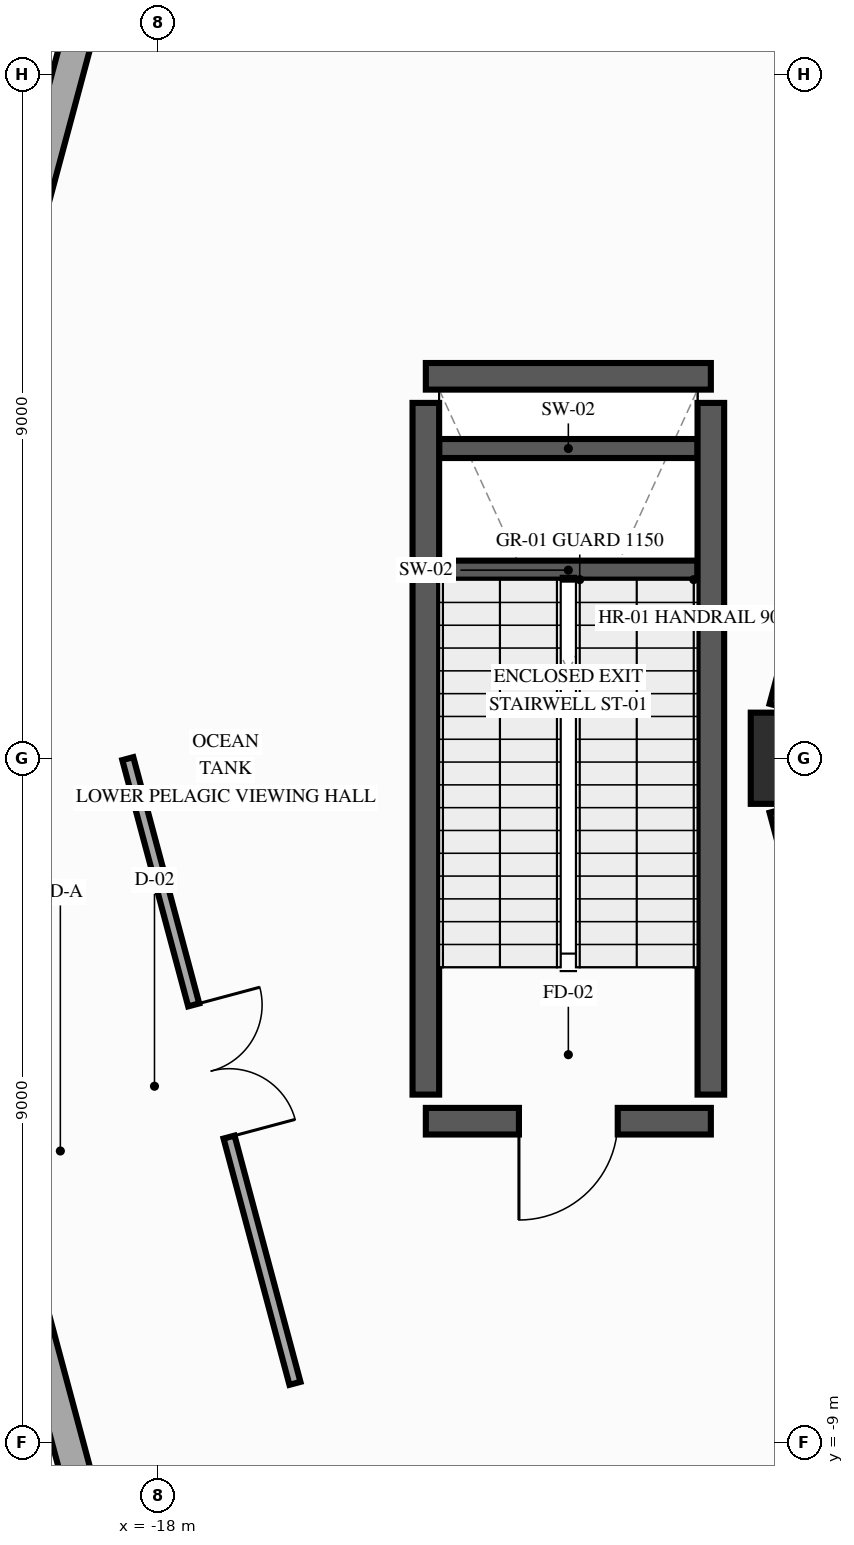
"""IFC4 building model, lengths in metres.
Left out: names, types, materials, properties, quantities, classifications, styles, units other than length and angle.
Written with IfcOpenShell. Run it as: python <this file> out.ifc"""

import sys

from ifc_helpers import new_model, si_unit, direction, frame, frame_2d, origin, origin_2d, place, context, subcontext, project, spatial, rectangle, extrude, element, fill, save


model = new_model("IFC4")
c1 = context("Model", 3, precision=1e-05, world=origin(), true_north=direction((0.0, 1.0)))
c2 = subcontext(c1, "Body", "Model", "MODEL_VIEW")
j1 = project(units=[si_unit("LENGTHUNIT", "METRE"), si_unit("PLANEANGLEUNIT", "RADIAN")], contexts=[c1])
p1 = place(None, origin())
s1 = spatial("IfcSite", under=j1, at=p1, CompositionType="ELEMENT")
p2 = place(p1, origin())
s2 = spatial("IfcBuilding", under=s1, at=p2, CompositionType="ELEMENT")
p3 = place(p2, origin())
s3 = spatial("IfcBuildingStorey", under=s2, at=p3, CompositionType="ELEMENT", Elevation=0.0)
p4 = place(p3, frame((-9.6, 0.0, 0.0), z_axis=(0.0, 0.0, 1.0), x_axis=(-1.0, 0.0, 0.0)))
e1 = element("IfcColumn", 1, at=p4, inside=s3, PredefinedType="COLUMN", context=c2, shape_type="SweptSolid", body=[
    extrude(rectangle(XDim=1.2, YDim=1.2, at=origin_2d()), origin(), (0.0, 0.0, 1.0), 5.4),
])
for number, where, z_axis, x_axis in (
    (2, (-8.469, 4.22, 0.0), (0.0, 0.0, 1.0), (-0.259, -0.966, 0.0)),
    (3, (-9.445, -0.58, 0.0), (0.0, 0.0, 1.0), (0.259, -0.966, 0.0)),
):
    element("IfcWall", number, at=place(p3, frame(where, z_axis=z_axis, x_axis=x_axis)), inside=s3, PredefinedType="SHEAR", context=c2, shape_type="SweptSolid", body=[
        extrude(rectangle(XDim=3.769, YDim=1.05, at=frame_2d((1.884, 0.0))), origin(), (0.0, 0.0, 1.0), 5.12),
    ])
p5 = place(p3, frame((-21.42, 0.671, 0.0), z_axis=(0.0, 0.0, 1.0), x_axis=(0.258787599316, 0.965934251614, 0.0)))
e4 = element("IfcWall", 4, at=p5, inside=s3, PredefinedType="SOLIDWALL", context=c2, shape_type="SweptSolid", body=[
    extrude(rectangle(XDim=9.792, YDim=0.4, at=frame_2d((4.896, 0.0))), origin(), (0.0, 0.0, 1.0), 4.255),
])
p6 = place(p5, frame((4.371, 0.0, 0.9)))
e5 = element("IfcOpeningElement", 5, at=p6, cuts=e4, PredefinedType="OPENING", context=c2, shape_type="SweptSolid", body=[
    extrude(rectangle(XDim=1.05, YDim=2.0, at=frame_2d((0.525, 1.0))), frame((0.0, 0.21, 0.0), z_axis=(0.0, -1.0, 0.0), x_axis=(1.0, 0.0, 0.0)), (0.0, 0.0, 1.0), 0.42),
])
p7 = place(p3, frame((-18.886, -10.129, 0.0), z_axis=(0.0, 0.0, 1.0), x_axis=(-0.258787599316, 0.965934251614, 0.0)))
e6 = element("IfcWall", 6, at=p7, inside=s3, PredefinedType="SOLIDWALL", context=c2, shape_type="SweptSolid", body=[
    extrude(rectangle(XDim=9.792, YDim=0.4, at=frame_2d((4.896, 0.0))), origin(), (0.0, 0.0, 1.0), 4.255),
])
p8 = place(p7, frame((3.296, 0.0, 0.0)))
e7 = element("IfcOpeningElement", 7, at=p8, cuts=e6, PredefinedType="OPENING", context=c2, shape_type="SweptSolid", body=[
    extrude(rectangle(XDim=3.2, YDim=3.0, at=frame_2d((1.6, 1.5))), frame((0.0, 0.21, 0.0), z_axis=(0.0, -1.0, 0.0), x_axis=(1.0, 0.0, 0.0)), (0.0, 0.0, 1.0), 0.42),
])
for number, where, z_axis, x_axis in (
    (8, (-14.3, 2.475, 0.0), (0.0, 0.0, 1.0), (1.0, 0.0, 0.0)),
    (9, (-14.3, 4.075, 0.0), (0.0, 0.0, 1.0), (1.0, 0.0, 0.0)),
):
    element("IfcWall", number, at=place(p3, frame(where, z_axis=z_axis, x_axis=x_axis)), inside=s3, PredefinedType="SHEAR", context=c2, shape_type="SweptSolid", body=[
        extrude(rectangle(XDim=3.4, YDim=0.25, at=frame_2d((1.7, 0.0))), origin(), (0.0, 0.0, 1.0), 2.5),
    ])
p9 = place(p3, frame((-10.725, -4.775, 0.0), z_axis=(0.0, 0.0, 1.0), x_axis=(-1.0, 0.0, 0.0)))
e10 = element("IfcWall", 10, at=p9, inside=s3, PredefinedType="SHEAR", context=c2, shape_type="SweptSolid", body=[
    extrude(rectangle(XDim=3.75, YDim=0.35, at=frame_2d((1.875, 0.0))), origin(), (0.0, 0.0, 1.0), 5.12),
])
p10 = place(p9, frame((1.225, 0.0, 0.0)))
e11 = element("IfcOpeningElement", 11, at=p10, cuts=e10, PredefinedType="OPENING", context=c2, shape_type="SweptSolid", body=[
    extrude(rectangle(XDim=1.3, YDim=2.2, at=frame_2d((0.65, 1.1))), frame((0.0, 0.185, 0.0), z_axis=(0.0, -1.0, 0.0), x_axis=(1.0, 0.0, 0.0)), (0.0, 0.0, 1.0), 0.37),
])
p11 = place(p3, frame((-14.475, 5.025, 0.0), z_axis=(0.0, 0.0, 1.0), x_axis=(1.0, 0.0, 0.0)))
e12 = element("IfcWall", 12, at=p11, inside=s3, PredefinedType="SHEAR", context=c2, shape_type="SweptSolid", body=[
    extrude(rectangle(XDim=3.75, YDim=0.35, at=frame_2d((1.875, 0.0))), origin(), (0.0, 0.0, 1.0), 5.12),
])
for number, where, z_axis, x_axis in (
    (13, (-14.475, -4.425, 0.0), (0.0, 0.0, 1.0), (0.0, 1.0, 0.0)),
    (14, (-10.725, -4.425, 0.0), (0.0, 0.0, 1.0), (0.0, 1.0, 0.0)),
):
    element("IfcWall", number, at=place(p3, frame(where, z_axis=z_axis, x_axis=x_axis)), inside=s3, PredefinedType="SHEAR", context=c2, shape_type="SweptSolid", body=[
        extrude(rectangle(XDim=9.1, YDim=0.35, at=frame_2d((4.55, 0.0))), origin(), (0.0, 0.0, 1.0), 5.12),
    ])
p12 = place(p3, frame((-18.396, -0.005, 0.0), z_axis=(0.0, 0.0, 1.0), x_axis=(0.258450171781, -0.966024590115, 0.0)))
e15 = element("IfcWall", 15, at=p12, inside=s3, PredefinedType="PARTITIONING", context=c2, shape_type="SweptSolid", body=[
    extrude(rectangle(XDim=8.508, YDim=0.15, at=frame_2d((4.254, 0.0))), origin(), (0.0, 0.0, 1.0), 5.05),
])
p13 = place(p12, frame((3.354, 0.0, 0.0)))
e16 = element("IfcOpeningElement", 16, at=p13, cuts=e15, PredefinedType="OPENING", context=c2, shape_type="SweptSolid", body=[
    extrude(rectangle(XDim=1.8, YDim=2.3, at=frame_2d((0.9, 1.15))), frame((0.0, 0.085, 0.0), z_axis=(0.0, -1.0, 0.0), x_axis=(1.0, 0.0, 0.0)), (0.0, 0.0, 1.0), 0.17),
])
p14 = place(p10, origin())
e17 = element("IfcDoor", 17, at=p14, inside=s3, OperationType="SINGLE_SWING_RIGHT", PredefinedType="DOOR", context=c2, shape_type="SweptSolid", body=[
    extrude(rectangle(XDim=1.3, YDim=2.2, at=frame_2d((0.65, 1.1))), frame((0.0, 0.025, 0.0), z_axis=(0.0, -1.0, 0.0), x_axis=(1.0, 0.0, 0.0)), (0.0, 0.0, 1.0), 0.05),
])
fill(e11, e17)
p15 = place(p13, origin())
e18 = element("IfcDoor", 18, at=p15, inside=s3, OperationType="DOUBLE_DOOR_SINGLE_SWING", PredefinedType="DOOR", context=c2, shape_type="SweptSolid", body=[
    extrude(rectangle(XDim=1.8, YDim=2.3, at=frame_2d((0.9, 1.15))), frame((0.0, 0.025, 0.0), z_axis=(0.0, -1.0, 0.0), x_axis=(1.0, 0.0, 0.0)), (0.0, 0.0, 1.0), 0.05),
])
fill(e16, e18)
save(model, sys.argv[1])
